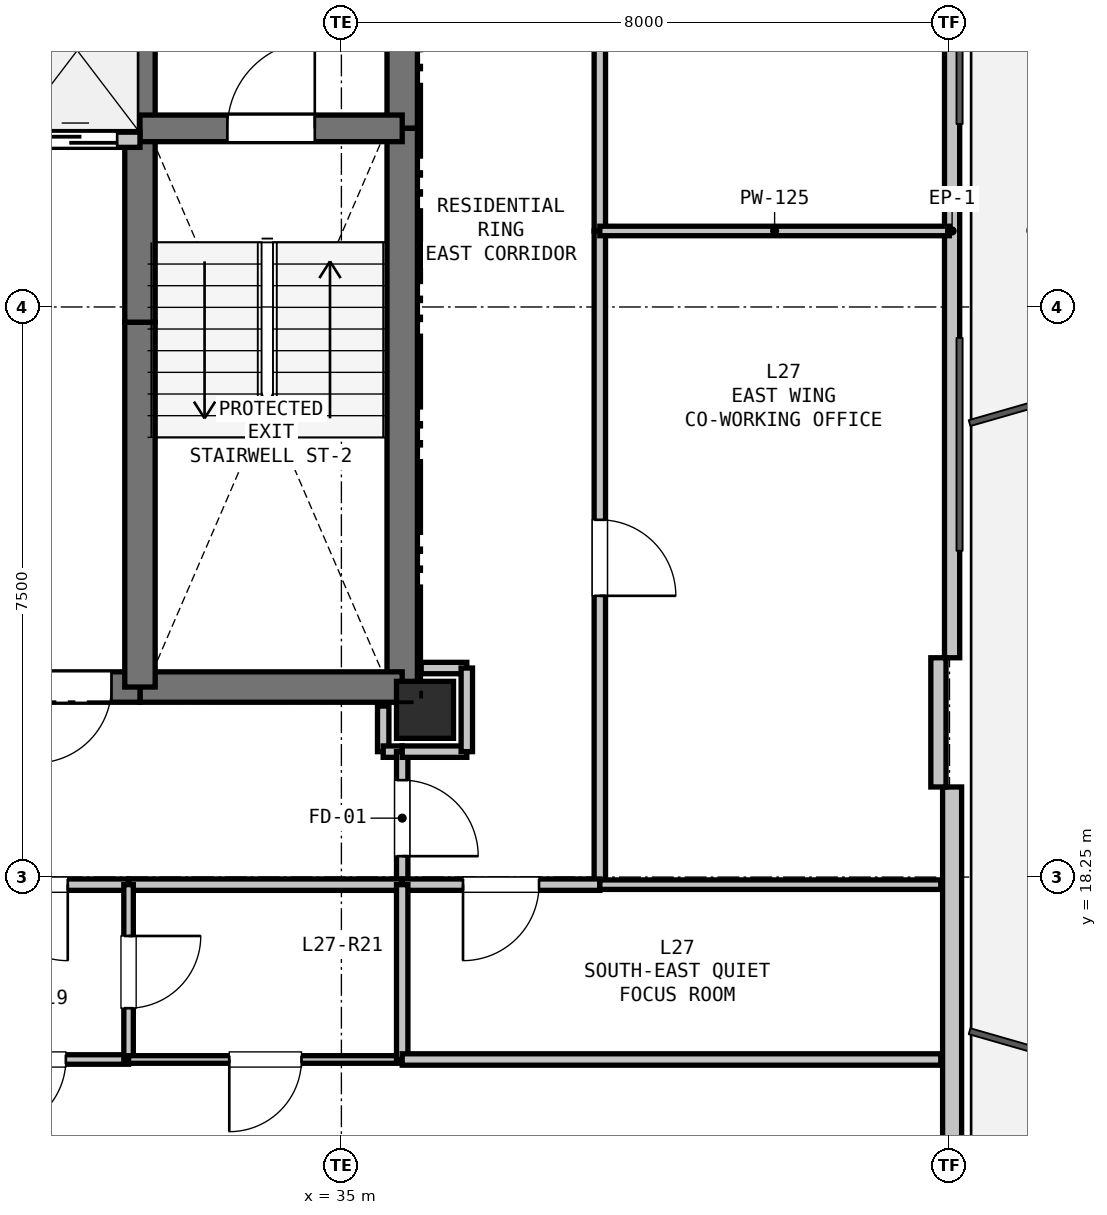
"""IFC4 building model, lengths in metres.
Left out: names, types, materials, properties, quantities, classifications, styles, units other than length and angle.
Written with IfcOpenShell. Run it as: python <this file> out.ifc"""

import sys

from ifc_helpers import new_model, si_unit, direction, frame, frame_2d, origin, origin_2d, place, context, subcontext, project, spatial, rectangle, extrude, element, fill, save


model = new_model("IFC4")
c1 = context("Model", 3, precision=1e-05, world=origin(), true_north=direction((0.0, 1.0)))
c2 = subcontext(c1, "Body", "Model", "MODEL_VIEW")
j1 = project(units=[si_unit("LENGTHUNIT", "METRE"), si_unit("PLANEANGLEUNIT", "RADIAN")], contexts=[c1])
p1 = place(None, origin())
s1 = spatial("IfcSite", under=j1, at=p1, CompositionType="ELEMENT")
p2 = place(p1, origin())
s2 = spatial("IfcBuilding", under=s1, at=p2, CompositionType="ELEMENT")
p3 = place(p2, frame((0.0, 0.0, 99.9)))
s3 = spatial("IfcBuildingStorey", under=s2, at=p3, CompositionType="ELEMENT", Elevation=99.9)
p4 = place(p3, frame((36.1, 20.45, 0.0), z_axis=(0.0, 0.0, 1.0), x_axis=(1.0, 0.0, 0.0)))
e1 = element("IfcColumn", 1, at=p4, inside=s3, PredefinedType="COLUMN", context=c2, shape_type="SweptSolid", body=[
    extrude(rectangle(XDim=0.75, YDim=0.75, at=origin_2d()), origin(), (0.0, 0.0, 1.0), 3.3),
])
p5 = place(p3, frame((43.035, 32.365, 0.0), z_axis=(0.0, 0.0, 1.0), x_axis=(0.0, -1.0, 0.0)))
e2 = element("IfcWall", 2, at=p5, inside=s3, PredefinedType="PARAPET", context=c2, shape_type="SweptSolid", body=[
    extrude(rectangle(XDim=11.229, YDim=0.2, at=frame_2d((5.615, 0.0))), origin(), (0.0, 0.0, 1.0), 0.2),
])
p6 = place(p3, frame((43.035, 19.435, 0.0), z_axis=(0.0, 0.0, 1.0), x_axis=(0.0, -1.0, 0.0)))
e3 = element("IfcWall", 3, at=p6, inside=s3, PredefinedType="SOLIDWALL", context=c2, shape_type="SweptSolid", body=[
    extrude(rectangle(XDim=11.93, YDim=0.25, at=frame_2d((5.965, 0.0))), origin(), (0.0, 0.0, 1.0), 2.67),
])
p7 = place(p6, frame((7.119, 0.0, 0.9)))
e4 = element("IfcOpeningElement", 4, at=p7, cuts=e3, PredefinedType="OPENING", context=c2, shape_type="SweptSolid", body=[
    extrude(rectangle(XDim=1.2, YDim=1.4, at=frame_2d((0.6, 0.7))), frame((0.0, 0.135, 0.0), z_axis=(0.0, -1.0, 0.0), x_axis=(1.0, 0.0, 0.0)), (0.0, 0.0, 1.0), 0.27),
])
p8 = place(p3, frame((42.854, 21.135, 0.0), z_axis=(0.0, 0.0, 1.0), x_axis=(0.0, -1.0, 0.0)))
e5 = element("IfcWall", 5, at=p8, inside=s3, PredefinedType="PARAPET", context=c2, shape_type="SweptSolid", body=[
    extrude(rectangle(XDim=1.7, YDim=0.2, at=frame_2d((0.85, 0.0))), origin(), (0.0, 0.0, 1.0), 2.67),
])
p9 = place(p3, frame((35.8, 32.75, 0.0), z_axis=(0.0, 0.0, 1.0), x_axis=(0.0, -1.0, 0.0)))
e6 = element("IfcWall", 6, at=p9, inside=s3, PredefinedType="SHEAR", context=c2, shape_type="SweptSolid", body=[
    extrude(rectangle(XDim=4.65, YDim=0.4, at=frame_2d((2.325, 0.0))), origin(), (0.0, 0.0, 1.0), 3.05),
])
p10 = place(p3, frame((35.8, 28.1, 0.0), z_axis=(0.0, 0.0, 1.0), x_axis=(0.0, -1.0, 0.0)))
e7 = element("IfcWall", 7, at=p10, inside=s3, PredefinedType="SHEAR", context=c2, shape_type="SweptSolid", body=[
    extrude(rectangle(XDim=7.35, YDim=0.4, at=frame_2d((3.675, 0.0))), origin(), (0.0, 0.0, 1.0), 3.05),
])
p11 = place(p3, frame((35.8, 20.75, 0.0), z_axis=(0.0, 0.0, 1.0), x_axis=(-1.0, 0.0, 0.0)))
e8 = element("IfcWall", 8, at=p11, inside=s3, PredefinedType="SHEAR", context=c2, shape_type="SweptSolid", body=[
    extrude(rectangle(XDim=3.45, YDim=0.4, at=frame_2d((1.725, 0.0))), origin(), (0.0, 0.0, 1.0), 3.05),
])
p12 = place(p3, frame((32.35, 20.75, 0.0), z_axis=(0.0, 0.0, 1.0), x_axis=(-1.0, 0.0, 0.0)))
e9 = element("IfcWall", 9, at=p12, inside=s3, PredefinedType="SHEAR", context=c2, shape_type="SweptSolid", body=[
    extrude(rectangle(XDim=1.75, YDim=0.4, at=frame_2d((0.875, 0.0))), origin(), (0.0, 0.0, 1.0), 3.05),
])
p13 = place(p12, frame((0.375, 0.0, 0.0)))
e10 = element("IfcOpeningElement", 10, at=p13, cuts=e9, PredefinedType="OPENING", context=c2, shape_type="SweptSolid", body=[
    extrude(rectangle(XDim=1.0, YDim=2.15, at=frame_2d((0.5, 1.075))), frame((0.0, 0.21, 0.0), z_axis=(0.0, -1.0, 0.0), x_axis=(1.0, 0.0, 0.0)), (0.0, 0.0, 1.0), 0.42),
])
p14 = place(p3, frame((32.35, 20.75, 0.0), z_axis=(0.0, 0.0, 1.0), x_axis=(0.0, 1.0, 0.0)))
e11 = element("IfcWall", 11, at=p14, inside=s3, PredefinedType="SHEAR", context=c2, shape_type="SweptSolid", body=[
    extrude(rectangle(XDim=4.8, YDim=0.4, at=frame_2d((2.4, 0.0))), origin(), (0.0, 0.0, 1.0), 3.05),
])
p15 = place(p3, frame((32.35, 25.55, 0.0), z_axis=(0.0, 0.0, 1.0), x_axis=(0.0, 1.0, 0.0)))
e12 = element("IfcWall", 12, at=p15, inside=s3, PredefinedType="SHEAR", context=c2, shape_type="SweptSolid", body=[
    extrude(rectangle(XDim=2.4, YDim=0.4, at=frame_2d((1.2, 0.0))), origin(), (0.0, 0.0, 1.0), 3.05),
])
p16 = place(p3, frame((32.35, 27.95, 0.0), z_axis=(0.0, 0.0, 1.0), x_axis=(0.0, 1.0, 0.0)))
e13 = element("IfcWall", 13, at=p16, inside=s3, PredefinedType="SHEAR", context=c2, shape_type="SweptSolid", body=[
    extrude(rectangle(XDim=2.8, YDim=0.4, at=frame_2d((1.4, 0.0))), origin(), (0.0, 0.0, 1.0), 3.05),
])
p17 = place(p3, frame((32.35, 28.1, 0.0), z_axis=(0.0, 0.0, 1.0), x_axis=(1.0, 0.0, 0.0)))
e14 = element("IfcWall", 14, at=p17, inside=s3, PredefinedType="SHEAR", context=c2, shape_type="SweptSolid", body=[
    extrude(rectangle(XDim=3.45, YDim=0.35, at=frame_2d((1.725, 0.0))), origin(), (0.0, 0.0, 1.0), 3.05),
])
p18 = place(p17, frame((1.15, 0.0, 0.0)))
e15 = element("IfcOpeningElement", 15, at=p18, cuts=e14, PredefinedType="OPENING", context=c2, shape_type="SweptSolid", body=[
    extrude(rectangle(XDim=1.15, YDim=2.15, at=frame_2d((0.575, 1.075))), frame((0.0, 0.185, 0.0), z_axis=(0.0, -1.0, 0.0), x_axis=(1.0, 0.0, 0.0)), (0.0, 0.0, 1.0), 0.37),
])
p19 = place(p3, frame((27.4, 27.95, 0.0), z_axis=(0.0, 0.0, 1.0), x_axis=(1.0, 0.0, 0.0)))
e16 = element("IfcWall", 16, at=p19, inside=s3, PredefinedType="PARTITIONING", context=c2, shape_type="SweptSolid", body=[
    extrude(rectangle(XDim=4.95, YDim=0.2, at=frame_2d((2.475, 0.0))), origin(), (0.0, 0.0, 1.0), 3.05),
])
p20 = place(p19, frame((0.25, 0.0, 0.0)))
e17 = element("IfcOpeningElement", 17, at=p20, cuts=e16, PredefinedType="OPENING", context=c2, shape_type="SweptSolid", body=[
    extrude(rectangle(XDim=1.1, YDim=2.15, at=frame_2d((0.55, 1.075))), frame((0.0, 0.11, 0.0), z_axis=(0.0, -1.0, 0.0), x_axis=(1.0, 0.0, 0.0)), (0.0, 0.0, 1.0), 0.22),
])
p21 = place(p19, frame((1.9, 0.0, 0.0)))
e18 = element("IfcOpeningElement", 18, at=p21, cuts=e16, PredefinedType="OPENING", context=c2, shape_type="SweptSolid", body=[
    extrude(rectangle(XDim=1.1, YDim=2.15, at=frame_2d((0.55, 1.075))), frame((0.0, 0.11, 0.0), z_axis=(0.0, -1.0, 0.0), x_axis=(1.0, 0.0, 0.0)), (0.0, 0.0, 1.0), 0.22),
])
p22 = place(p19, frame((3.55, 0.0, 0.0)))
e19 = element("IfcOpeningElement", 19, at=p22, cuts=e16, PredefinedType="OPENING", context=c2, shape_type="SweptSolid", body=[
    extrude(rectangle(XDim=1.1, YDim=2.15, at=frame_2d((0.55, 1.075))), frame((0.0, 0.11, 0.0), z_axis=(0.0, -1.0, 0.0), x_axis=(1.0, 0.0, 0.0)), (0.0, 0.0, 1.0), 0.22),
])
p23 = place(p3, frame((35.55, 20.5, 0.0), z_axis=(0.0, 0.0, 1.0), x_axis=(0.0, -1.0, 0.0)))
e20 = element("IfcWall", 20, at=p23, inside=s3, PredefinedType="PARTITIONING", context=c2, shape_type="SweptSolid", body=[
    extrude(rectangle(XDim=0.6, YDim=0.15, at=frame_2d((0.3, 0.0))), origin(), (0.0, 0.0, 1.0), 2.498),
])
p24 = place(p3, frame((35.55, 19.9, 0.0), z_axis=(0.0, 0.0, 1.0), x_axis=(1.0, 0.0, 0.0)))
e21 = element("IfcWall", 21, at=p24, inside=s3, PredefinedType="PARTITIONING", context=c2, shape_type="SweptSolid", body=[
    extrude(rectangle(XDim=0.25, YDim=0.15, at=frame_2d((0.125, 0.0))), origin(), (0.0, 0.0, 1.0), 3.05),
])
p25 = place(p3, frame((35.8, 19.9, 0.0), z_axis=(0.0, 0.0, 1.0), x_axis=(0.0, -1.0, 0.0)))
e22 = element("IfcWall", 22, at=p25, inside=s3, PredefinedType="PARTITIONING", context=c2, shape_type="SweptSolid", body=[
    extrude(rectangle(XDim=1.75, YDim=0.15, at=frame_2d((0.875, 0.0))), origin(), (0.0, 0.0, 1.0), 3.05),
])
p26 = place(p25, frame((0.375, 0.0, 0.0)))
e23 = element("IfcOpeningElement", 23, at=p26, cuts=e22, PredefinedType="OPENING", context=c2, shape_type="SweptSolid", body=[
    extrude(rectangle(XDim=1.0, YDim=2.15, at=frame_2d((0.5, 1.075))), frame((0.0, 0.085, 0.0), z_axis=(0.0, -1.0, 0.0), x_axis=(1.0, 0.0, 0.0)), (0.0, 0.0, 1.0), 0.17),
])
p27 = place(p3, frame((35.8, 18.15, 0.0), z_axis=(0.0, 0.0, 1.0), x_axis=(-1.0, 0.0, 0.0)))
e24 = element("IfcWall", 24, at=p27, inside=s3, PredefinedType="PARTITIONING", context=c2, shape_type="SweptSolid", body=[
    extrude(rectangle(XDim=3.6, YDim=0.15, at=frame_2d((1.8, 0.0))), origin(), (0.0, 0.0, 1.0), 3.05),
])
p28 = place(p3, frame((32.2, 18.15, 0.0), z_axis=(0.0, 0.0, 1.0), x_axis=(-1.0, 0.0, 0.0)))
e25 = element("IfcWall", 25, at=p28, inside=s3, PredefinedType="PARTITIONING", context=c2, shape_type="SweptSolid", body=[
    extrude(rectangle(XDim=2.6, YDim=0.15, at=frame_2d((1.3, 0.0))), origin(), (0.0, 0.0, 1.0), 3.05),
])
p29 = place(p28, frame((0.8, 0.0, 0.0)))
e26 = element("IfcOpeningElement", 26, at=p29, cuts=e25, PredefinedType="OPENING", context=c2, shape_type="SweptSolid", body=[
    extrude(rectangle(XDim=1.0, YDim=2.15, at=frame_2d((0.5, 1.075))), frame((0.0, 0.085, 0.0), z_axis=(0.0, -1.0, 0.0), x_axis=(1.0, 0.0, 0.0)), (0.0, 0.0, 1.0), 0.17),
])
p30 = place(p3, frame((36.65, 21.0, 0.0), z_axis=(0.0, 0.0, 1.0), x_axis=(-1.0, 0.0, 0.0)))
e27 = element("IfcWall", 27, at=p30, inside=s3, PredefinedType="PARTITIONING", context=c2, shape_type="SweptSolid", body=[
    extrude(rectangle(XDim=0.6, YDim=0.15, at=frame_2d((0.3, 0.0))), origin(), (0.0, 0.0, 1.0), 2.498),
])
p31 = place(p3, frame((38.4, 35.35, 0.0), z_axis=(0.0, 0.0, 1.0), x_axis=(0.0, -1.0, 0.0)))
e28 = element("IfcWall", 28, at=p31, inside=s3, PredefinedType="PARTITIONING", context=c2, shape_type="SweptSolid", body=[
    extrude(rectangle(XDim=8.6, YDim=0.15, at=frame_2d((4.3, 0.0))), origin(), (0.0, 0.0, 1.0), 3.05),
])
p32 = place(p31, frame((3.8, 0.0, 0.0)))
e29 = element("IfcOpeningElement", 29, at=p32, cuts=e28, PredefinedType="OPENING", context=c2, shape_type="SweptSolid", body=[
    extrude(rectangle(XDim=1.0, YDim=2.15, at=frame_2d((0.5, 1.075))), frame((0.0, 0.085, 0.0), z_axis=(0.0, -1.0, 0.0), x_axis=(1.0, 0.0, 0.0)), (0.0, 0.0, 1.0), 0.17),
])
p33 = place(p3, frame((38.4, 26.75, 0.0), z_axis=(0.0, 0.0, 1.0), x_axis=(0.0, -1.0, 0.0)))
e30 = element("IfcWall", 30, at=p33, inside=s3, PredefinedType="PARTITIONING", context=c2, shape_type="SweptSolid", body=[
    extrude(rectangle(XDim=8.6, YDim=0.15, at=frame_2d((4.3, 0.0))), origin(), (0.0, 0.0, 1.0), 3.05),
])
p34 = place(p33, frame((3.8, 0.0, 0.0)))
e31 = element("IfcOpeningElement", 31, at=p34, cuts=e30, PredefinedType="OPENING", context=c2, shape_type="SweptSolid", body=[
    extrude(rectangle(XDim=1.0, YDim=2.15, at=frame_2d((0.5, 1.075))), frame((0.0, 0.085, 0.0), z_axis=(0.0, -1.0, 0.0), x_axis=(1.0, 0.0, 0.0)), (0.0, 0.0, 1.0), 0.17),
])
p35 = place(p3, frame((38.4, 18.15, 0.0), z_axis=(0.0, 0.0, 1.0), x_axis=(-1.0, 0.0, 0.0)))
e32 = element("IfcWall", 32, at=p35, inside=s3, PredefinedType="PARTITIONING", context=c2, shape_type="SweptSolid", body=[
    extrude(rectangle(XDim=2.6, YDim=0.15, at=frame_2d((1.3, 0.0))), origin(), (0.0, 0.0, 1.0), 2.423),
])
p36 = place(p35, frame((0.8, 0.0, 0.0)))
e33 = element("IfcOpeningElement", 33, at=p36, cuts=e32, PredefinedType="OPENING", context=c2, shape_type="SweptSolid", body=[
    extrude(rectangle(XDim=1.0, YDim=2.15, at=frame_2d((0.5, 1.075))), frame((0.0, 0.085, 0.0), z_axis=(0.0, -1.0, 0.0), x_axis=(1.0, 0.0, 0.0)), (0.0, 0.0, 1.0), 0.17),
])
p37 = place(p3, frame((35.8, 19.9, 0.0), z_axis=(0.0, 0.0, 1.0), x_axis=(1.0, 0.0, 0.0)))
e34 = element("IfcWall", 34, at=p37, inside=s3, PredefinedType="PARTITIONING", context=c2, shape_type="SweptSolid", body=[
    extrude(rectangle(XDim=0.85, YDim=0.15, at=frame_2d((0.425, 0.0))), origin(), (0.0, 0.0, 1.0), 2.423),
])
p38 = place(p3, frame((36.65, 19.9, 0.0), z_axis=(0.0, 0.0, 1.0), x_axis=(0.0, 1.0, 0.0)))
e35 = element("IfcWall", 35, at=p38, inside=s3, PredefinedType="PARTITIONING", context=c2, shape_type="SweptSolid", body=[
    extrude(rectangle(XDim=1.1, YDim=0.15, at=frame_2d((0.55, 0.0))), origin(), (0.0, 0.0, 1.0), 3.05),
])
p39 = place(p3, frame((32.2, 15.85, 0.0), z_axis=(0.0, 0.0, 1.0), x_axis=(-1.0, 0.0, 0.0)))
e36 = element("IfcWall", 36, at=p39, inside=s3, PredefinedType="PARTITIONING", context=c2, shape_type="SweptSolid", body=[
    extrude(rectangle(XDim=2.6, YDim=0.125, at=frame_2d((1.3, 0.0))), origin(), (0.0, 0.0, 1.0), 3.05),
])
p40 = place(p39, frame((0.825, 0.0, 0.0)))
e37 = element("IfcOpeningElement", 37, at=p40, cuts=e36, PredefinedType="OPENING", context=c2, shape_type="SweptSolid", body=[
    extrude(rectangle(XDim=0.95, YDim=2.1, at=frame_2d((0.475, 1.05))), frame((0.0, 0.073, 0.0), z_axis=(0.0, -1.0, 0.0), x_axis=(1.0, 0.0, 0.0)), (0.0, 0.0, 1.0), 0.145),
])
p41 = place(p3, frame((32.2, 18.15, 0.0), z_axis=(0.0, 0.0, 1.0), x_axis=(0.0, -1.0, 0.0)))
e38 = element("IfcWall", 38, at=p41, inside=s3, PredefinedType="PARTITIONING", context=c2, shape_type="SweptSolid", body=[
    extrude(rectangle(XDim=2.3, YDim=0.125, at=frame_2d((1.15, 0.0))), origin(), (0.0, 0.0, 1.0), 3.05),
])
p42 = place(p41, frame((0.675, 0.0, 0.0)))
e39 = element("IfcOpeningElement", 39, at=p42, cuts=e38, PredefinedType="OPENING", context=c2, shape_type="SweptSolid", body=[
    extrude(rectangle(XDim=0.95, YDim=2.1, at=frame_2d((0.475, 1.05))), frame((0.0, 0.073, 0.0), z_axis=(0.0, -1.0, 0.0), x_axis=(1.0, 0.0, 0.0)), (0.0, 0.0, 1.0), 0.145),
])
p43 = place(p3, frame((35.8, 15.85, 0.0), z_axis=(0.0, 0.0, 1.0), x_axis=(-1.0, 0.0, 0.0)))
e40 = element("IfcWall", 40, at=p43, inside=s3, PredefinedType="PARTITIONING", context=c2, shape_type="SweptSolid", body=[
    extrude(rectangle(XDim=3.6, YDim=0.1, at=frame_2d((1.8, 0.0))), origin(), (0.0, 0.0, 1.0), 3.05),
])
p44 = place(p43, frame((1.325, 0.0, 0.0)))
e41 = element("IfcOpeningElement", 41, at=p44, cuts=e40, PredefinedType="OPENING", context=c2, shape_type="SweptSolid", body=[
    extrude(rectangle(XDim=0.95, YDim=2.1, at=frame_2d((0.475, 1.05))), frame((0.0, 0.06, 0.0), z_axis=(0.0, -1.0, 0.0), x_axis=(1.0, 0.0, 0.0)), (0.0, 0.0, 1.0), 0.12),
])
p45 = place(p3, frame((35.8, 18.15, 0.0), z_axis=(0.0, 0.0, 1.0), x_axis=(0.0, -1.0, 0.0)))
e42 = element("IfcWall", 42, at=p45, inside=s3, PredefinedType="PARTITIONING", context=c2, shape_type="SweptSolid", body=[
    extrude(rectangle(XDim=2.3, YDim=0.15, at=frame_2d((1.15, 0.0))), origin(), (0.0, 0.0, 1.0), 3.05),
])
p46 = place(p3, frame((38.4, 18.15, 0.0), z_axis=(0.0, 0.0, 1.0), x_axis=(1.0, 0.0, 0.0)))
e43 = element("IfcWall", 43, at=p46, inside=s3, PredefinedType="PARTITIONING", context=c2, shape_type="SweptSolid", body=[
    extrude(rectangle(XDim=4.486, YDim=0.125, at=frame_2d((2.243, 0.0))), origin(), (0.0, 0.0, 1.0), 2.365),
])
p47 = place(p3, frame((42.885, 15.85, 0.0), z_axis=(0.0, 0.0, 1.0), x_axis=(-1.0, 0.0, 0.0)))
e44 = element("IfcWall", 44, at=p47, inside=s3, PredefinedType="PARTITIONING", context=c2, shape_type="SweptSolid", body=[
    extrude(rectangle(XDim=7.085, YDim=0.15, at=frame_2d((3.543, 0.0))), origin(), (0.0, 0.0, 1.0), 2.365),
])
p48 = place(p3, frame((42.999, 26.75, 0.0), z_axis=(0.0, 0.0, 1.0), x_axis=(-1.0, 0.0, 0.0)))
e45 = element("IfcWall", 45, at=p48, inside=s3, PredefinedType="PARTITIONING", context=c2, shape_type="SweptSolid", body=[
    extrude(rectangle(XDim=4.599, YDim=0.125, at=frame_2d((2.299, 0.0))), origin(), (0.0, 0.0, 1.0), 2.365),
])
p49 = place(p22, origin())
e46 = element("IfcDoor", 46, at=p49, inside=s3, OperationType="SLIDING_TO_LEFT", PredefinedType="DOOR", context=c2, shape_type="SweptSolid", body=[
    extrude(rectangle(XDim=1.1, YDim=2.15, at=frame_2d((0.55, 1.075))), frame((0.0, 0.025, 0.0), z_axis=(0.0, -1.0, 0.0), x_axis=(1.0, 0.0, 0.0)), (0.0, 0.0, 1.0), 0.05),
])
fill(e19, e46)
p50 = place(p13, origin())
e47 = element("IfcDoor", 47, at=p50, inside=s3, OperationType="SINGLE_SWING_RIGHT", PredefinedType="DOOR", context=c2, shape_type="SweptSolid", body=[
    extrude(rectangle(XDim=1.0, YDim=2.15, at=frame_2d((0.5, 1.075))), frame((0.0, 0.025, 0.0), z_axis=(0.0, -1.0, 0.0), x_axis=(1.0, 0.0, 0.0)), (0.0, 0.0, 1.0), 0.05),
])
fill(e10, e47)
p51 = place(p18, origin())
e48 = element("IfcDoor", 48, at=p51, inside=s3, OperationType="SINGLE_SWING_RIGHT", PredefinedType="DOOR", context=c2, shape_type="SweptSolid", body=[
    extrude(rectangle(XDim=1.15, YDim=2.15, at=frame_2d((0.575, 1.075))), frame((0.0, 0.025, 0.0), z_axis=(0.0, -1.0, 0.0), x_axis=(1.0, 0.0, 0.0)), (0.0, 0.0, 1.0), 0.05),
])
fill(e15, e48)
p52 = place(p26, origin())
e49 = element("IfcDoor", 49, at=p52, inside=s3, OperationType="SINGLE_SWING_RIGHT", PredefinedType="DOOR", context=c2, shape_type="SweptSolid", body=[
    extrude(rectangle(XDim=1.0, YDim=2.15, at=frame_2d((0.5, 1.075))), frame((0.0, 0.025, 0.0), z_axis=(0.0, -1.0, 0.0), x_axis=(1.0, 0.0, 0.0)), (0.0, 0.0, 1.0), 0.05),
])
fill(e23, e49)
p53 = place(p29, origin())
e50 = element("IfcDoor", 50, at=p53, inside=s3, OperationType="SINGLE_SWING_LEFT", PredefinedType="DOOR", context=c2, shape_type="SweptSolid", body=[
    extrude(rectangle(XDim=1.0, YDim=2.15, at=frame_2d((0.5, 1.075))), frame((0.0, 0.025, 0.0), z_axis=(0.0, -1.0, 0.0), x_axis=(1.0, 0.0, 0.0)), (0.0, 0.0, 1.0), 0.05),
])
fill(e26, e50)
p54 = place(p36, origin())
e51 = element("IfcDoor", 51, at=p54, inside=s3, OperationType="SINGLE_SWING_RIGHT", PredefinedType="DOOR", context=c2, shape_type="SweptSolid", body=[
    extrude(rectangle(XDim=1.0, YDim=2.15, at=frame_2d((0.5, 1.075))), frame((0.0, 0.025, 0.0), z_axis=(0.0, -1.0, 0.0), x_axis=(1.0, 0.0, 0.0)), (0.0, 0.0, 1.0), 0.05),
])
fill(e33, e51)
p55 = place(p34, origin())
e52 = element("IfcDoor", 52, at=p55, inside=s3, OperationType="SINGLE_SWING_RIGHT", PredefinedType="DOOR", context=c2, shape_type="SweptSolid", body=[
    extrude(rectangle(XDim=1.0, YDim=2.15, at=frame_2d((0.5, 1.075))), frame((0.0, 0.025, 0.0), z_axis=(0.0, -1.0, 0.0), x_axis=(1.0, 0.0, 0.0)), (0.0, 0.0, 1.0), 0.05),
])
fill(e31, e52)
p56 = place(p42, origin())
e53 = element("IfcDoor", 53, at=p56, inside=s3, OperationType="SINGLE_SWING_LEFT", PredefinedType="DOOR", context=c2, shape_type="SweptSolid", body=[
    extrude(rectangle(XDim=0.95, YDim=2.1, at=frame_2d((0.475, 1.05))), frame((0.0, 0.025, 0.0), z_axis=(0.0, -1.0, 0.0), x_axis=(1.0, 0.0, 0.0)), (0.0, 0.0, 1.0), 0.05),
])
fill(e39, e53)
p57 = place(p40, origin())
e54 = element("IfcDoor", 54, at=p57, inside=s3, OperationType="SINGLE_SWING_RIGHT", PredefinedType="DOOR", context=c2, shape_type="SweptSolid", body=[
    extrude(rectangle(XDim=0.95, YDim=2.1, at=frame_2d((0.475, 1.05))), frame((0.0, 0.025, 0.0), z_axis=(0.0, -1.0, 0.0), x_axis=(1.0, 0.0, 0.0)), (0.0, 0.0, 1.0), 0.05),
])
fill(e37, e54)
p58 = place(p44, origin())
e55 = element("IfcDoor", 55, at=p58, inside=s3, OperationType="SINGLE_SWING_RIGHT", PredefinedType="DOOR", context=c2, shape_type="SweptSolid", body=[
    extrude(rectangle(XDim=0.95, YDim=2.1, at=frame_2d((0.475, 1.05))), frame((0.0, 0.025, 0.0), z_axis=(0.0, -1.0, 0.0), x_axis=(1.0, 0.0, 0.0)), (0.0, 0.0, 1.0), 0.05),
])
fill(e41, e55)
save(model, sys.argv[1])
